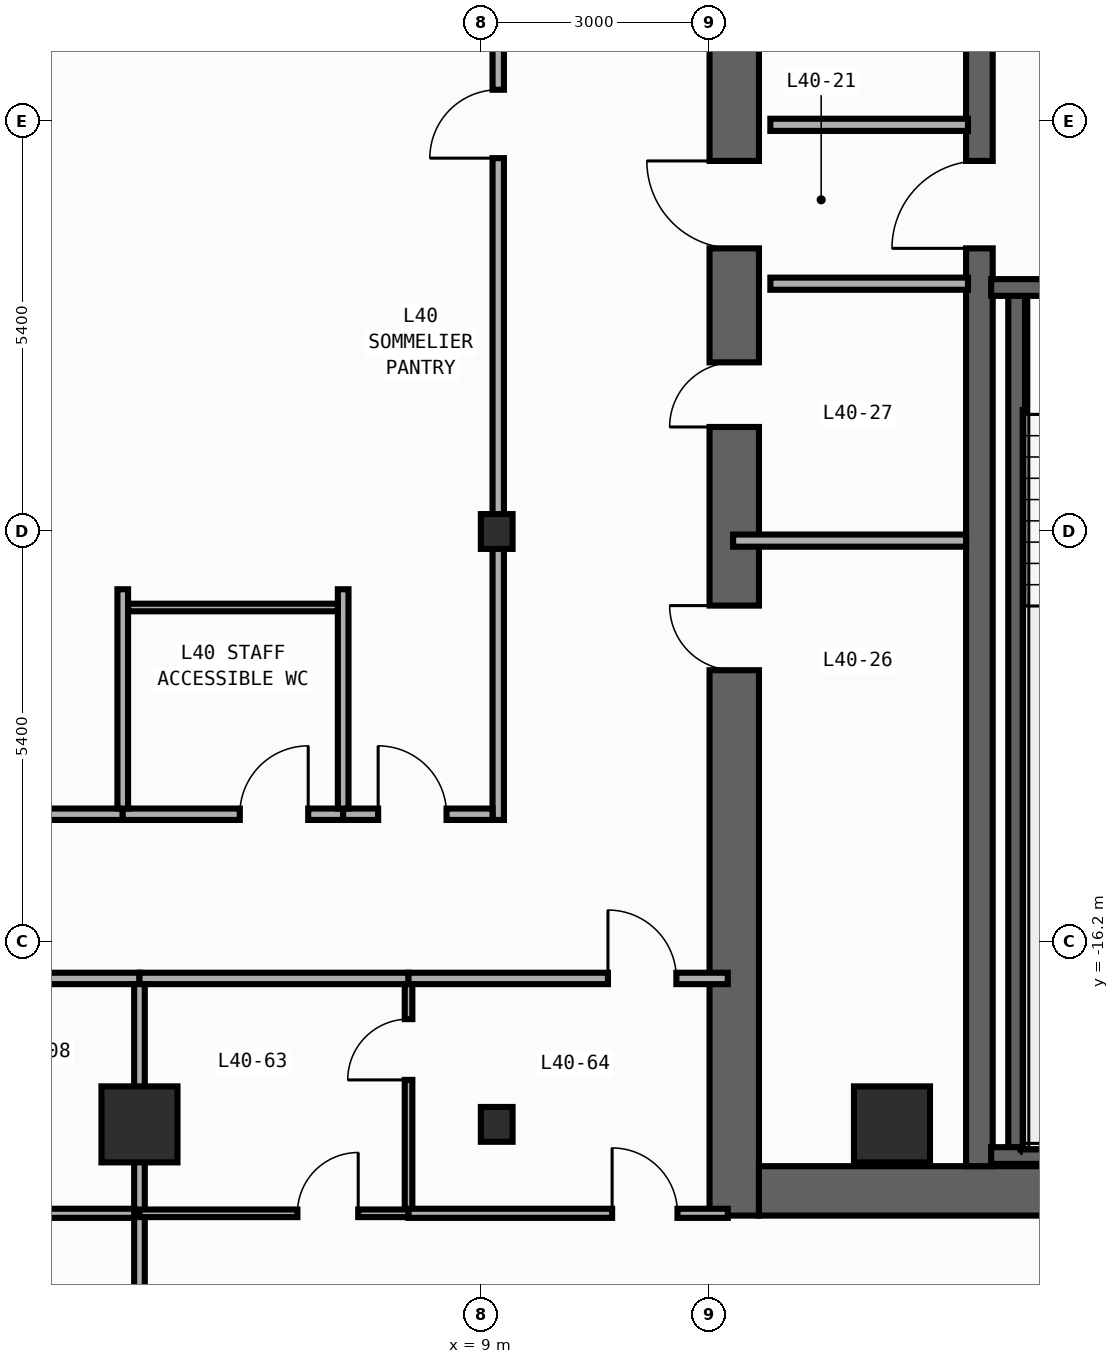
"""IFC4 building model, lengths in metres.
Left out: names, types, materials, properties, quantities, classifications, styles, units other than length and angle.
Written with IfcOpenShell. Run it as: python <this file> out.ifc"""

import sys

from ifc_helpers import new_model, si_unit, direction, frame, frame_2d, origin, origin_2d, place, context, subcontext, project, spatial, rectangle, i_section, extrude, element, fill, save


model = new_model("IFC4")
c1 = context("Model", 3, precision=1e-05, world=origin(), true_north=direction((0.0, 1.0)))
c2 = subcontext(c1, "Body", "Model", "MODEL_VIEW")
j1 = project(units=[si_unit("LENGTHUNIT", "METRE"), si_unit("PLANEANGLEUNIT", "RADIAN")], contexts=[c1])
p1 = place(None, origin())
s1 = spatial("IfcSite", under=j1, at=p1, CompositionType="ELEMENT")
p2 = place(p1, origin())
s2 = spatial("IfcBuilding", under=s1, at=p2, CompositionType="ELEMENT")
p3 = place(p2, frame((0.0, 0.0, 176.4)))
s3 = spatial("IfcBuildingStorey", under=s2, at=p3, CompositionType="ELEMENT", Elevation=176.4)
p4 = place(p3, frame((12.325, -19.8, 0.0), z_axis=(0.0, 0.0, 1.0), x_axis=(0.0, 1.0, 0.0)))
e1 = element("IfcWall", 1, at=p4, inside=s3, PredefinedType="SHEAR", context=c2, shape_type="SweptSolid", body=[
    extrude(rectangle(XDim=27.0, YDim=0.65, at=frame_2d((13.5, 0.0))), origin(), (0.0, 0.0, 1.0), 3.54),
])
p5 = place(p4, frame((23.05, 0.0, 0.0)))
e2 = element("IfcOpeningElement", 2, at=p5, cuts=e1, PredefinedType="OPENING", context=c2, shape_type="SweptSolid", body=[
    extrude(rectangle(XDim=1.1, YDim=2.2, at=frame_2d((0.55, 1.1))), frame((0.0, 0.335, 0.0), z_axis=(0.0, -1.0, 0.0), x_axis=(1.0, 0.0, 0.0)), (0.0, 0.0, 1.0), 0.67),
])
p6 = place(p4, frame((19.85, 0.0, 0.0)))
e3 = element("IfcOpeningElement", 3, at=p6, cuts=e1, PredefinedType="OPENING", context=c2, shape_type="SweptSolid", body=[
    extrude(rectangle(XDim=1.1, YDim=2.2, at=frame_2d((0.55, 1.1))), frame((0.0, 0.335, 0.0), z_axis=(0.0, -1.0, 0.0), x_axis=(1.0, 0.0, 0.0)), (0.0, 0.0, 1.0), 0.67),
])
p7 = place(p4, frame((16.65, 0.0, 0.0)))
e4 = element("IfcOpeningElement", 4, at=p7, cuts=e1, PredefinedType="OPENING", context=c2, shape_type="SweptSolid", body=[
    extrude(rectangle(XDim=1.1, YDim=2.2, at=frame_2d((0.55, 1.1))), frame((0.0, 0.335, 0.0), z_axis=(0.0, -1.0, 0.0), x_axis=(1.0, 0.0, 0.0)), (0.0, 0.0, 1.0), 0.67),
])
p8 = place(p4, frame((7.175, 0.0, 0.0)))
e5 = element("IfcOpeningElement", 5, at=p8, cuts=e1, PredefinedType="OPENING", context=c2, shape_type="SweptSolid", body=[
    extrude(rectangle(XDim=0.85, YDim=2.1, at=frame_2d((0.425, 1.05))), frame((0.0, 0.335, 0.0), z_axis=(0.0, -1.0, 0.0), x_axis=(1.0, 0.0, 0.0)), (0.0, 0.0, 1.0), 0.67),
])
p9 = place(p4, frame((10.375, 0.0, 0.0)))
e6 = element("IfcOpeningElement", 6, at=p9, cuts=e1, PredefinedType="OPENING", context=c2, shape_type="SweptSolid", body=[
    extrude(rectangle(XDim=0.85, YDim=2.1, at=frame_2d((0.425, 1.05))), frame((0.0, 0.335, 0.0), z_axis=(0.0, -1.0, 0.0), x_axis=(1.0, 0.0, 0.0)), (0.0, 0.0, 1.0), 0.67),
])
p10 = place(p4, frame((12.725, 0.0, 0.0)))
e7 = element("IfcOpeningElement", 7, at=p10, cuts=e1, PredefinedType="OPENING", context=c2, shape_type="SweptSolid", body=[
    extrude(rectangle(XDim=1.15, YDim=2.2, at=frame_2d((0.575, 1.1))), frame((0.0, 0.335, 0.0), z_axis=(0.0, -1.0, 0.0), x_axis=(1.0, 0.0, 0.0)), (0.0, 0.0, 1.0), 0.67),
])
p11 = place(p4, frame((25.125, 0.0, 0.0)))
e8 = element("IfcOpeningElement", 8, at=p11, cuts=e1, PredefinedType="OPENING", context=c2, shape_type="SweptSolid", body=[
    extrude(rectangle(XDim=0.85, YDim=2.1, at=frame_2d((0.425, 1.05))), frame((0.0, 0.335, 0.0), z_axis=(0.0, -1.0, 0.0), x_axis=(1.0, 0.0, 0.0)), (0.0, 0.0, 1.0), 0.67),
])
p12 = place(p3, frame((12.65, -19.475, 0.0), z_axis=(0.0, 0.0, 1.0), x_axis=(1.0, 0.0, 0.0)))
e9 = element("IfcWall", 9, at=p12, inside=s3, PredefinedType="SHEAR", context=c2, shape_type="SweptSolid", body=[
    extrude(rectangle(XDim=7.1, YDim=0.65, at=frame_2d((3.55, 0.0))), origin(), (0.0, 0.0, 1.0), 3.54),
])
p13 = place(p3, frame((15.55, -19.15, 0.0), z_axis=(0.0, 0.0, 1.0), x_axis=(0.0, 1.0, 0.0)))
e10 = element("IfcWall", 10, at=p13, inside=s3, PredefinedType="SHEAR", context=c2, shape_type="SweptSolid", body=[
    extrude(rectangle(XDim=25.7, YDim=0.35, at=frame_2d((12.85, 0.0))), origin(), (0.0, 0.0, 1.0), 3.54),
])
p14 = place(p13, frame((12.075, 0.0, 0.0)))
e11 = element("IfcOpeningElement", 11, at=p14, cuts=e10, PredefinedType="OPENING", context=c2, shape_type="SweptSolid", body=[
    extrude(rectangle(XDim=1.15, YDim=2.2, at=frame_2d((0.575, 1.1))), frame((0.0, 0.185, 0.0), z_axis=(0.0, -1.0, 0.0), x_axis=(1.0, 0.0, 0.0)), (0.0, 0.0, 1.0), 0.37),
])
p15 = place(p13, frame((24.475, 0.0, 0.0)))
e12 = element("IfcOpeningElement", 12, at=p15, cuts=e10, PredefinedType="OPENING", context=c2, shape_type="SweptSolid", body=[
    extrude(rectangle(XDim=0.85, YDim=2.1, at=frame_2d((0.425, 1.05))), frame((0.0, 0.185, 0.0), z_axis=(0.0, -1.0, 0.0), x_axis=(1.0, 0.0, 0.0)), (0.0, 0.0, 1.0), 0.37),
])
p16 = place(p3, frame((16.04, -19.01, 0.0), z_axis=(0.0, 0.0, 1.0), x_axis=(0.0, 1.0, 0.0)))
e13 = element("IfcWall", 13, at=p16, inside=s3, PredefinedType="SHEAR", context=c2, shape_type="SweptSolid", body=[
    extrude(rectangle(XDim=11.42, YDim=0.22, at=frame_2d((5.71, 0.0))), origin(), (0.0, 0.0, 1.0), 3.54),
])
p17 = place(p3, frame((15.705, -19.01, 0.0), z_axis=(0.0, 0.0, 1.0), x_axis=(1.0, 0.0, 0.0)))
e14 = element("IfcWall", 14, at=p17, inside=s3, PredefinedType="SHEAR", context=c2, shape_type="SweptSolid", body=[
    extrude(rectangle(XDim=4.065, YDim=0.22, at=frame_2d((2.032, 0.0))), origin(), (0.0, 0.0, 1.0), 3.54),
])
p18 = place(p3, frame((19.77, -7.59, 0.0), z_axis=(0.0, 0.0, 1.0), x_axis=(-1.0, 0.0, 0.0)))
e15 = element("IfcWall", 15, at=p18, inside=s3, PredefinedType="SHEAR", context=c2, shape_type="SweptSolid", body=[
    extrude(rectangle(XDim=4.065, YDim=0.22, at=frame_2d((2.032, 0.0))), origin(), (0.0, 0.0, 1.0), 3.54),
])
p19 = place(p18, frame((1.08, 0.0, 0.0)))
e16 = element("IfcOpeningElement", 16, at=p19, cuts=e15, PredefinedType="OPENING", context=c2, shape_type="SweptSolid", body=[
    extrude(rectangle(XDim=1.1, YDim=2.2, at=frame_2d((0.55, 1.1))), frame((0.0, 0.12, 0.0), z_axis=(0.0, -1.0, 0.0), x_axis=(1.0, 0.0, 0.0)), (0.0, 0.0, 1.0), 0.24),
])
for number, where, z_axis, x_axis in (
    (17, (9.2, -18.6, 0.0), (0.0, 0.0, 1.0), (1.0, 0.0, 0.0)),
    (18, (9.2, -10.8, 0.0), (0.0, 0.0, 1.0), (1.0, 0.0, 0.0)),
):
    element("IfcColumn", number, at=place(p3, frame(where, z_axis=z_axis, x_axis=x_axis)), inside=s3, PredefinedType="COLUMN", context=c2, shape_type="SweptSolid", body=[
        extrude(i_section(OverallWidth=0.417, OverallDepth=0.458, WebThickness=0.03, FlangeThickness=0.05, FilletRadius=0.022, at=origin_2d()), origin(), (0.0, 0.0, 1.0), 3.8),
    ])
for number, where, z_axis, x_axis in (
    (19, (14.4, -18.6, 0.0), (0.0, 0.0, 1.0), (1.0, 0.0, 0.0)),
    (20, (4.5, -18.6, 0.0), (0.0, 0.0, 1.0), (1.0, 0.0, 0.0)),
):
    element("IfcColumn", number, at=place(p3, frame(where, z_axis=z_axis, x_axis=x_axis)), inside=s3, PredefinedType="COLUMN", context=c2, shape_type="SweptSolid", body=[
        extrude(rectangle(XDim=1.0, YDim=1.0, at=origin_2d()), origin(), (0.0, 0.0, 1.0), 3.8),
    ])
for number, where, z_axis, x_axis in (
    (21, (12.8, -5.45, 0.0), (0.0, 0.0, 1.0), (1.0, 0.0, 0.0)),
    (22, (12.8, -7.54, 0.0), (0.0, 0.0, 1.0), (1.0, 0.0, 0.0)),
):
    element("IfcWall", number, at=place(p3, frame(where, z_axis=z_axis, x_axis=x_axis)), inside=s3, PredefinedType="STANDARD", context=c2, shape_type="SweptSolid", body=[
        extrude(rectangle(XDim=2.6, YDim=0.16, at=frame_2d((1.3, 0.0))), origin(), (0.0, 0.0, 1.0), 3.54),
    ])
p20 = place(p3, frame((12.31, -10.92, 0.0), z_axis=(0.0, 0.0, 1.0), x_axis=(1.0, 0.0, 0.0)))
e23 = element("IfcWall", 23, at=p20, inside=s3, PredefinedType="PARTITIONING", context=c2, shape_type="SweptSolid", body=[
    extrude(rectangle(XDim=3.065, YDim=0.16, at=frame_2d((1.532, 0.0))), origin(), (0.0, 0.0, 1.0), 2.952),
])
p21 = place(p3, frame((9.22, -14.595, 0.0), z_axis=(0.0, 0.0, 1.0), x_axis=(0.0, 1.0, 0.0)))
e24 = element("IfcWall", 24, at=p21, inside=s3, PredefinedType="PARTITIONING", context=c2, shape_type="SweptSolid", body=[
    extrude(rectangle(XDim=15.095, YDim=0.15, at=frame_2d((7.547, 0.0))), origin(), (0.0, 0.0, 1.0), 2.952),
])
p22 = place(p21, frame((8.707, 0.0, 0.0)))
e25 = element("IfcOpeningElement", 25, at=p22, cuts=e24, PredefinedType="OPENING", context=c2, shape_type="SweptSolid", body=[
    extrude(rectangle(XDim=0.9, YDim=2.15, at=frame_2d((0.45, 1.075))), frame((0.0, 0.085, 0.0), z_axis=(0.0, -1.0, 0.0), x_axis=(1.0, 0.0, 0.0)), (0.0, 0.0, 1.0), 0.17),
])
p23 = place(p3, frame((-3.32, -14.52, 0.0), z_axis=(0.0, 0.0, 1.0), x_axis=(1.0, 0.0, 0.0)))
e26 = element("IfcWall", 26, at=p23, inside=s3, PredefinedType="PARTITIONING", context=c2, shape_type="SweptSolid", body=[
    extrude(rectangle(XDim=7.6, YDim=0.15, at=frame_2d((3.8, 0.0))), origin(), (0.0, 0.0, 1.0), 3.54),
])
p24 = place(p23, frame((0.667, 0.0, 0.0)))
e27 = element("IfcOpeningElement", 27, at=p24, cuts=e26, PredefinedType="OPENING", context=c2, shape_type="SweptSolid", body=[
    extrude(rectangle(XDim=0.9, YDim=2.15, at=frame_2d((0.45, 1.075))), frame((0.0, 0.085, 0.0), z_axis=(0.0, -1.0, 0.0), x_axis=(1.0, 0.0, 0.0)), (0.0, 0.0, 1.0), 0.17),
])
p25 = place(p3, frame((4.28, -14.52, 0.0), z_axis=(0.0, 0.0, 1.0), x_axis=(1.0, 0.0, 0.0)))
e28 = element("IfcWall", 28, at=p25, inside=s3, PredefinedType="PARTITIONING", context=c2, shape_type="SweptSolid", body=[
    extrude(rectangle(XDim=2.9, YDim=0.15, at=frame_2d((1.45, 0.0))), origin(), (0.0, 0.0, 1.0), 3.54),
])
p26 = place(p25, frame((1.54, 0.0, 0.0)))
e29 = element("IfcOpeningElement", 29, at=p26, cuts=e28, PredefinedType="OPENING", context=c2, shape_type="SweptSolid", body=[
    extrude(rectangle(XDim=0.9, YDim=2.15, at=frame_2d((0.45, 1.075))), frame((0.0, 0.085, 0.0), z_axis=(0.0, -1.0, 0.0), x_axis=(1.0, 0.0, 0.0)), (0.0, 0.0, 1.0), 0.17),
])
p27 = place(p3, frame((7.18, -14.52, 0.0), z_axis=(0.0, 0.0, 1.0), x_axis=(1.0, 0.0, 0.0)))
e30 = element("IfcWall", 30, at=p27, inside=s3, PredefinedType="PARTITIONING", context=c2, shape_type="SweptSolid", body=[
    extrude(rectangle(XDim=1.965, YDim=0.15, at=frame_2d((0.982, 0.0))), origin(), (0.0, 0.0, 1.0), 3.54),
])
p28 = place(p27, frame((0.46, 0.0, 0.0)))
e31 = element("IfcOpeningElement", 31, at=p28, cuts=e30, PredefinedType="OPENING", context=c2, shape_type="SweptSolid", body=[
    extrude(rectangle(XDim=0.9, YDim=2.15, at=frame_2d((0.45, 1.075))), frame((0.0, 0.085, 0.0), z_axis=(0.0, -1.0, 0.0), x_axis=(1.0, 0.0, 0.0)), (0.0, 0.0, 1.0), 0.17),
])
p29 = place(p3, frame((-0.96, -16.68, 0.0), z_axis=(0.0, 0.0, 1.0), x_axis=(1.0, 0.0, 0.0)))
e32 = element("IfcWall", 32, at=p29, inside=s3, PredefinedType="PARTITIONING", context=c2, shape_type="SweptSolid", body=[
    extrude(rectangle(XDim=5.46, YDim=0.15, at=frame_2d((2.73, 0.0))), origin(), (0.0, 0.0, 1.0), 3.54),
])
p30 = place(p29, frame((2.684, 0.0, 0.0)))
e33 = element("IfcOpeningElement", 33, at=p30, cuts=e32, PredefinedType="OPENING", context=c2, shape_type="SweptSolid", body=[
    extrude(rectangle(XDim=0.9, YDim=2.15, at=frame_2d((0.45, 1.075))), frame((0.0, 0.085, 0.0), z_axis=(0.0, -1.0, 0.0), x_axis=(1.0, 0.0, 0.0)), (0.0, 0.0, 1.0), 0.17),
])
p31 = place(p3, frame((4.5, -16.68, 0.0), z_axis=(0.0, 0.0, 1.0), x_axis=(1.0, 0.0, 0.0)))
e34 = element("IfcWall", 34, at=p31, inside=s3, PredefinedType="PARTITIONING", context=c2, shape_type="SweptSolid", body=[
    extrude(rectangle(XDim=3.54, YDim=0.15, at=frame_2d((1.77, 0.0))), origin(), (0.0, 0.0, 1.0), 3.54),
])
p32 = place(p3, frame((8.04, -16.68, 0.0), z_axis=(0.0, 0.0, 1.0), x_axis=(1.0, 0.0, 0.0)))
e35 = element("IfcWall", 35, at=p32, inside=s3, PredefinedType="PARTITIONING", context=c2, shape_type="SweptSolid", body=[
    extrude(rectangle(XDim=4.2, YDim=0.15, at=frame_2d((2.1, 0.0))), origin(), (0.0, 0.0, 1.0), 3.54),
])
p33 = place(p32, frame((2.624, 0.0, 0.0)))
e36 = element("IfcOpeningElement", 36, at=p33, cuts=e35, PredefinedType="OPENING", context=c2, shape_type="SweptSolid", body=[
    extrude(rectangle(XDim=0.9, YDim=2.15, at=frame_2d((0.45, 1.075))), frame((0.0, 0.085, 0.0), z_axis=(0.0, -1.0, 0.0), x_axis=(1.0, 0.0, 0.0)), (0.0, 0.0, 1.0), 0.17),
])
for number, where, z_axis, x_axis in (
    (37, (4.28, -14.445, 0.0), (0.0, 0.0, 1.0), (0.0, 1.0, 0.0)),
    (38, (7.18, -14.445, 0.0), (0.0, 0.0, 1.0), (0.0, 1.0, 0.0)),
):
    element("IfcWall", number, at=place(p3, frame(where, z_axis=z_axis, x_axis=x_axis)), inside=s3, PredefinedType="PARTITIONING", context=c2, shape_type="SweptSolid", body=[
        extrude(rectangle(XDim=2.885, YDim=0.14, at=frame_2d((1.442, 0.0))), origin(), (0.0, 0.0, 1.0), 3.54),
    ])
p34 = place(p3, frame((-0.96, -19.77, 0.0), z_axis=(0.0, 0.0, 1.0), x_axis=(1.0, 0.0, 0.0)))
e39 = element("IfcWall", 39, at=p34, inside=s3, PredefinedType="PARTITIONING", context=c2, shape_type="SweptSolid", body=[
    extrude(rectangle(XDim=5.46, YDim=0.12, at=frame_2d((2.73, 0.0))), origin(), (0.0, 0.0, 1.0), 3.54),
])
p35 = place(p34, frame((2.709, 0.0, 0.0)))
e40 = element("IfcOpeningElement", 40, at=p35, cuts=e39, PredefinedType="OPENING", context=c2, shape_type="SweptSolid", body=[
    extrude(rectangle(XDim=0.86, YDim=2.15, at=frame_2d((0.43, 1.075))), frame((0.0, 0.07, 0.0), z_axis=(0.0, -1.0, 0.0), x_axis=(1.0, 0.0, 0.0)), (0.0, 0.0, 1.0), 0.14),
])
p36 = place(p3, frame((4.5, -19.77, 0.0), z_axis=(0.0, 0.0, 1.0), x_axis=(0.0, 1.0, 0.0)))
e41 = element("IfcWall", 41, at=p36, inside=s3, PredefinedType="PARTITIONING", context=c2, shape_type="SweptSolid", body=[
    extrude(rectangle(XDim=3.015, YDim=0.14, at=frame_2d((1.508, 0.0))), origin(), (0.0, 0.0, 1.0), 3.54),
])
p37 = place(p3, frame((4.5, -25.248, 0.0), z_axis=(0.0, 0.0, 1.0), x_axis=(0.0, 1.0, 0.0)))
e42 = element("IfcWall", 42, at=p37, inside=s3, PredefinedType="PARTITIONING", context=c2, shape_type="SweptSolid", body=[
    extrude(rectangle(XDim=5.478, YDim=0.14, at=frame_2d((2.739, 0.0))), origin(), (0.0, 0.0, 1.0), 3.54),
])
p38 = place(p3, frame((8.04, -19.72, 0.0), z_axis=(0.0, 0.0, 1.0), x_axis=(0.0, 1.0, 0.0)))
e43 = element("IfcWall", 43, at=p38, inside=s3, PredefinedType="PARTITIONING", context=c2, shape_type="SweptSolid", body=[
    extrude(rectangle(XDim=2.965, YDim=0.1, at=frame_2d((1.482, 0.0))), origin(), (0.0, 0.0, 1.0), 3.54),
])
p39 = place(p38, frame((1.705, 0.0, 0.0)))
e44 = element("IfcOpeningElement", 44, at=p39, cuts=e43, PredefinedType="OPENING", context=c2, shape_type="SweptSolid", body=[
    extrude(rectangle(XDim=0.8, YDim=2.1, at=frame_2d((0.4, 1.05))), frame((0.0, 0.06, 0.0), z_axis=(0.0, -1.0, 0.0), x_axis=(1.0, 0.0, 0.0)), (0.0, 0.0, 1.0), 0.12),
])
p40 = place(p3, frame((4.5, -19.77, 0.0), z_axis=(0.0, 0.0, 1.0), x_axis=(1.0, 0.0, 0.0)))
e45 = element("IfcWall", 45, at=p40, inside=s3, PredefinedType="PARTITIONING", context=c2, shape_type="SweptSolid", body=[
    extrude(rectangle(XDim=3.54, YDim=0.1, at=frame_2d((1.77, 0.0))), origin(), (0.0, 0.0, 1.0), 3.54),
])
p41 = place(p40, frame((2.078, 0.0, 0.0)))
e46 = element("IfcOpeningElement", 46, at=p41, cuts=e45, PredefinedType="OPENING", context=c2, shape_type="SweptSolid", body=[
    extrude(rectangle(XDim=0.8, YDim=2.1, at=frame_2d((0.4, 1.05))), frame((0.0, 0.06, 0.0), z_axis=(0.0, -1.0, 0.0), x_axis=(1.0, 0.0, 0.0)), (0.0, 0.0, 1.0), 0.12),
])
p42 = place(p3, frame((8.04, -19.77, 0.0), z_axis=(0.0, 0.0, 1.0), x_axis=(1.0, 0.0, 0.0)))
e47 = element("IfcWall", 47, at=p42, inside=s3, PredefinedType="PARTITIONING", context=c2, shape_type="SweptSolid", body=[
    extrude(rectangle(XDim=4.2, YDim=0.12, at=frame_2d((2.1, 0.0))), origin(), (0.0, 0.0, 1.0), 3.54),
])
p43 = place(p42, frame((2.678, 0.0, 0.0)))
e48 = element("IfcOpeningElement", 48, at=p43, cuts=e47, PredefinedType="OPENING", context=c2, shape_type="SweptSolid", body=[
    extrude(rectangle(XDim=0.86, YDim=2.15, at=frame_2d((0.43, 1.075))), frame((0.0, 0.07, 0.0), z_axis=(0.0, -1.0, 0.0), x_axis=(1.0, 0.0, 0.0)), (0.0, 0.0, 1.0), 0.14),
])
p44 = place(p3, frame((4.35, -11.8, 0.0), z_axis=(0.0, 0.0, 1.0), x_axis=(1.0, 0.0, 0.0)))
e49 = element("IfcWall", 49, at=p44, inside=s3, PredefinedType="PARTITIONING", context=c2, shape_type="SweptSolid", body=[
    extrude(rectangle(XDim=2.76, YDim=0.1, at=frame_2d((1.38, 0.0))), origin(), (0.0, 0.0, 1.0), 3.54),
])
p45 = place(p8, origin())
e50 = element("IfcDoor", 50, at=p45, inside=s3, OperationType="SINGLE_SWING_RIGHT", PredefinedType="DOOR", context=c2, shape_type="SweptSolid", body=[
    extrude(rectangle(XDim=0.85, YDim=2.1, at=frame_2d((0.425, 1.05))), frame((0.0, 0.025, 0.0), z_axis=(0.0, -1.0, 0.0), x_axis=(1.0, 0.0, 0.0)), (0.0, 0.0, 1.0), 0.05),
])
fill(e5, e50)
p46 = place(p9, origin())
e51 = element("IfcDoor", 51, at=p46, inside=s3, OperationType="SINGLE_SWING_LEFT", PredefinedType="DOOR", context=c2, shape_type="SweptSolid", body=[
    extrude(rectangle(XDim=0.85, YDim=2.1, at=frame_2d((0.425, 1.05))), frame((0.0, 0.025, 0.0), z_axis=(0.0, -1.0, 0.0), x_axis=(1.0, 0.0, 0.0)), (0.0, 0.0, 1.0), 0.05),
])
fill(e6, e51)
p47 = place(p10, origin())
e52 = element("IfcDoor", 52, at=p47, inside=s3, OperationType="SINGLE_SWING_RIGHT", PredefinedType="DOOR", context=c2, shape_type="SweptSolid", body=[
    extrude(rectangle(XDim=1.15, YDim=2.2, at=frame_2d((0.575, 1.1))), frame((0.0, 0.025, 0.0), z_axis=(0.0, -1.0, 0.0), x_axis=(1.0, 0.0, 0.0)), (0.0, 0.0, 1.0), 0.05),
])
fill(e7, e52)
p48 = place(p14, origin())
e53 = element("IfcDoor", 53, at=p48, inside=s3, OperationType="SINGLE_SWING_LEFT", PredefinedType="DOOR", context=c2, shape_type="SweptSolid", body=[
    extrude(rectangle(XDim=1.15, YDim=2.2, at=frame_2d((0.575, 1.1))), frame((0.0, 0.025, 0.0), z_axis=(0.0, -1.0, 0.0), x_axis=(1.0, 0.0, 0.0)), (0.0, 0.0, 1.0), 0.05),
])
fill(e11, e53)
p49 = place(p22, origin())
e54 = element("IfcDoor", 54, at=p49, inside=s3, OperationType="SINGLE_SWING_LEFT", PredefinedType="DOOR", context=c2, shape_type="SweptSolid", body=[
    extrude(rectangle(XDim=0.9, YDim=2.15, at=frame_2d((0.45, 1.075))), frame((0.0, 0.025, 0.0), z_axis=(0.0, -1.0, 0.0), x_axis=(1.0, 0.0, 0.0)), (0.0, 0.0, 1.0), 0.05),
])
fill(e25, e54)
p50 = place(p26, origin())
e55 = element("IfcDoor", 55, at=p50, inside=s3, OperationType="SINGLE_SWING_RIGHT", PredefinedType="DOOR", context=c2, shape_type="SweptSolid", body=[
    extrude(rectangle(XDim=0.9, YDim=2.15, at=frame_2d((0.45, 1.075))), frame((0.0, 0.025, 0.0), z_axis=(0.0, -1.0, 0.0), x_axis=(1.0, 0.0, 0.0)), (0.0, 0.0, 1.0), 0.05),
])
fill(e29, e55)
p51 = place(p28, origin())
e56 = element("IfcDoor", 56, at=p51, inside=s3, OperationType="SINGLE_SWING_LEFT", PredefinedType="DOOR", context=c2, shape_type="SweptSolid", body=[
    extrude(rectangle(XDim=0.9, YDim=2.15, at=frame_2d((0.45, 1.075))), frame((0.0, 0.025, 0.0), z_axis=(0.0, -1.0, 0.0), x_axis=(1.0, 0.0, 0.0)), (0.0, 0.0, 1.0), 0.05),
])
fill(e31, e56)
p52 = place(p33, origin())
e57 = element("IfcDoor", 57, at=p52, inside=s3, OperationType="SINGLE_SWING_LEFT", PredefinedType="DOOR", context=c2, shape_type="SweptSolid", body=[
    extrude(rectangle(XDim=0.9, YDim=2.15, at=frame_2d((0.45, 1.075))), frame((0.0, 0.025, 0.0), z_axis=(0.0, -1.0, 0.0), x_axis=(1.0, 0.0, 0.0)), (0.0, 0.0, 1.0), 0.05),
])
fill(e36, e57)
p53 = place(p39, origin())
e58 = element("IfcDoor", 58, at=p53, inside=s3, OperationType="SINGLE_SWING_LEFT", PredefinedType="DOOR", context=c2, shape_type="SweptSolid", body=[
    extrude(rectangle(XDim=0.8, YDim=2.1, at=frame_2d((0.4, 1.05))), frame((0.0, 0.025, 0.0), z_axis=(0.0, -1.0, 0.0), x_axis=(1.0, 0.0, 0.0)), (0.0, 0.0, 1.0), 0.05),
])
fill(e44, e58)
p54 = place(p41, origin())
e59 = element("IfcDoor", 59, at=p54, inside=s3, OperationType="SINGLE_SWING_RIGHT", PredefinedType="DOOR", context=c2, shape_type="SweptSolid", body=[
    extrude(rectangle(XDim=0.8, YDim=2.1, at=frame_2d((0.4, 1.05))), frame((0.0, 0.025, 0.0), z_axis=(0.0, -1.0, 0.0), x_axis=(1.0, 0.0, 0.0)), (0.0, 0.0, 1.0), 0.05),
])
fill(e46, e59)
p55 = place(p43, origin())
e60 = element("IfcDoor", 60, at=p55, inside=s3, OperationType="SINGLE_SWING_LEFT", PredefinedType="DOOR", context=c2, shape_type="SweptSolid", body=[
    extrude(rectangle(XDim=0.86, YDim=2.15, at=frame_2d((0.43, 1.075))), frame((0.0, 0.025, 0.0), z_axis=(0.0, -1.0, 0.0), x_axis=(1.0, 0.0, 0.0)), (0.0, 0.0, 1.0), 0.05),
])
fill(e48, e60)
save(model, sys.argv[1])
